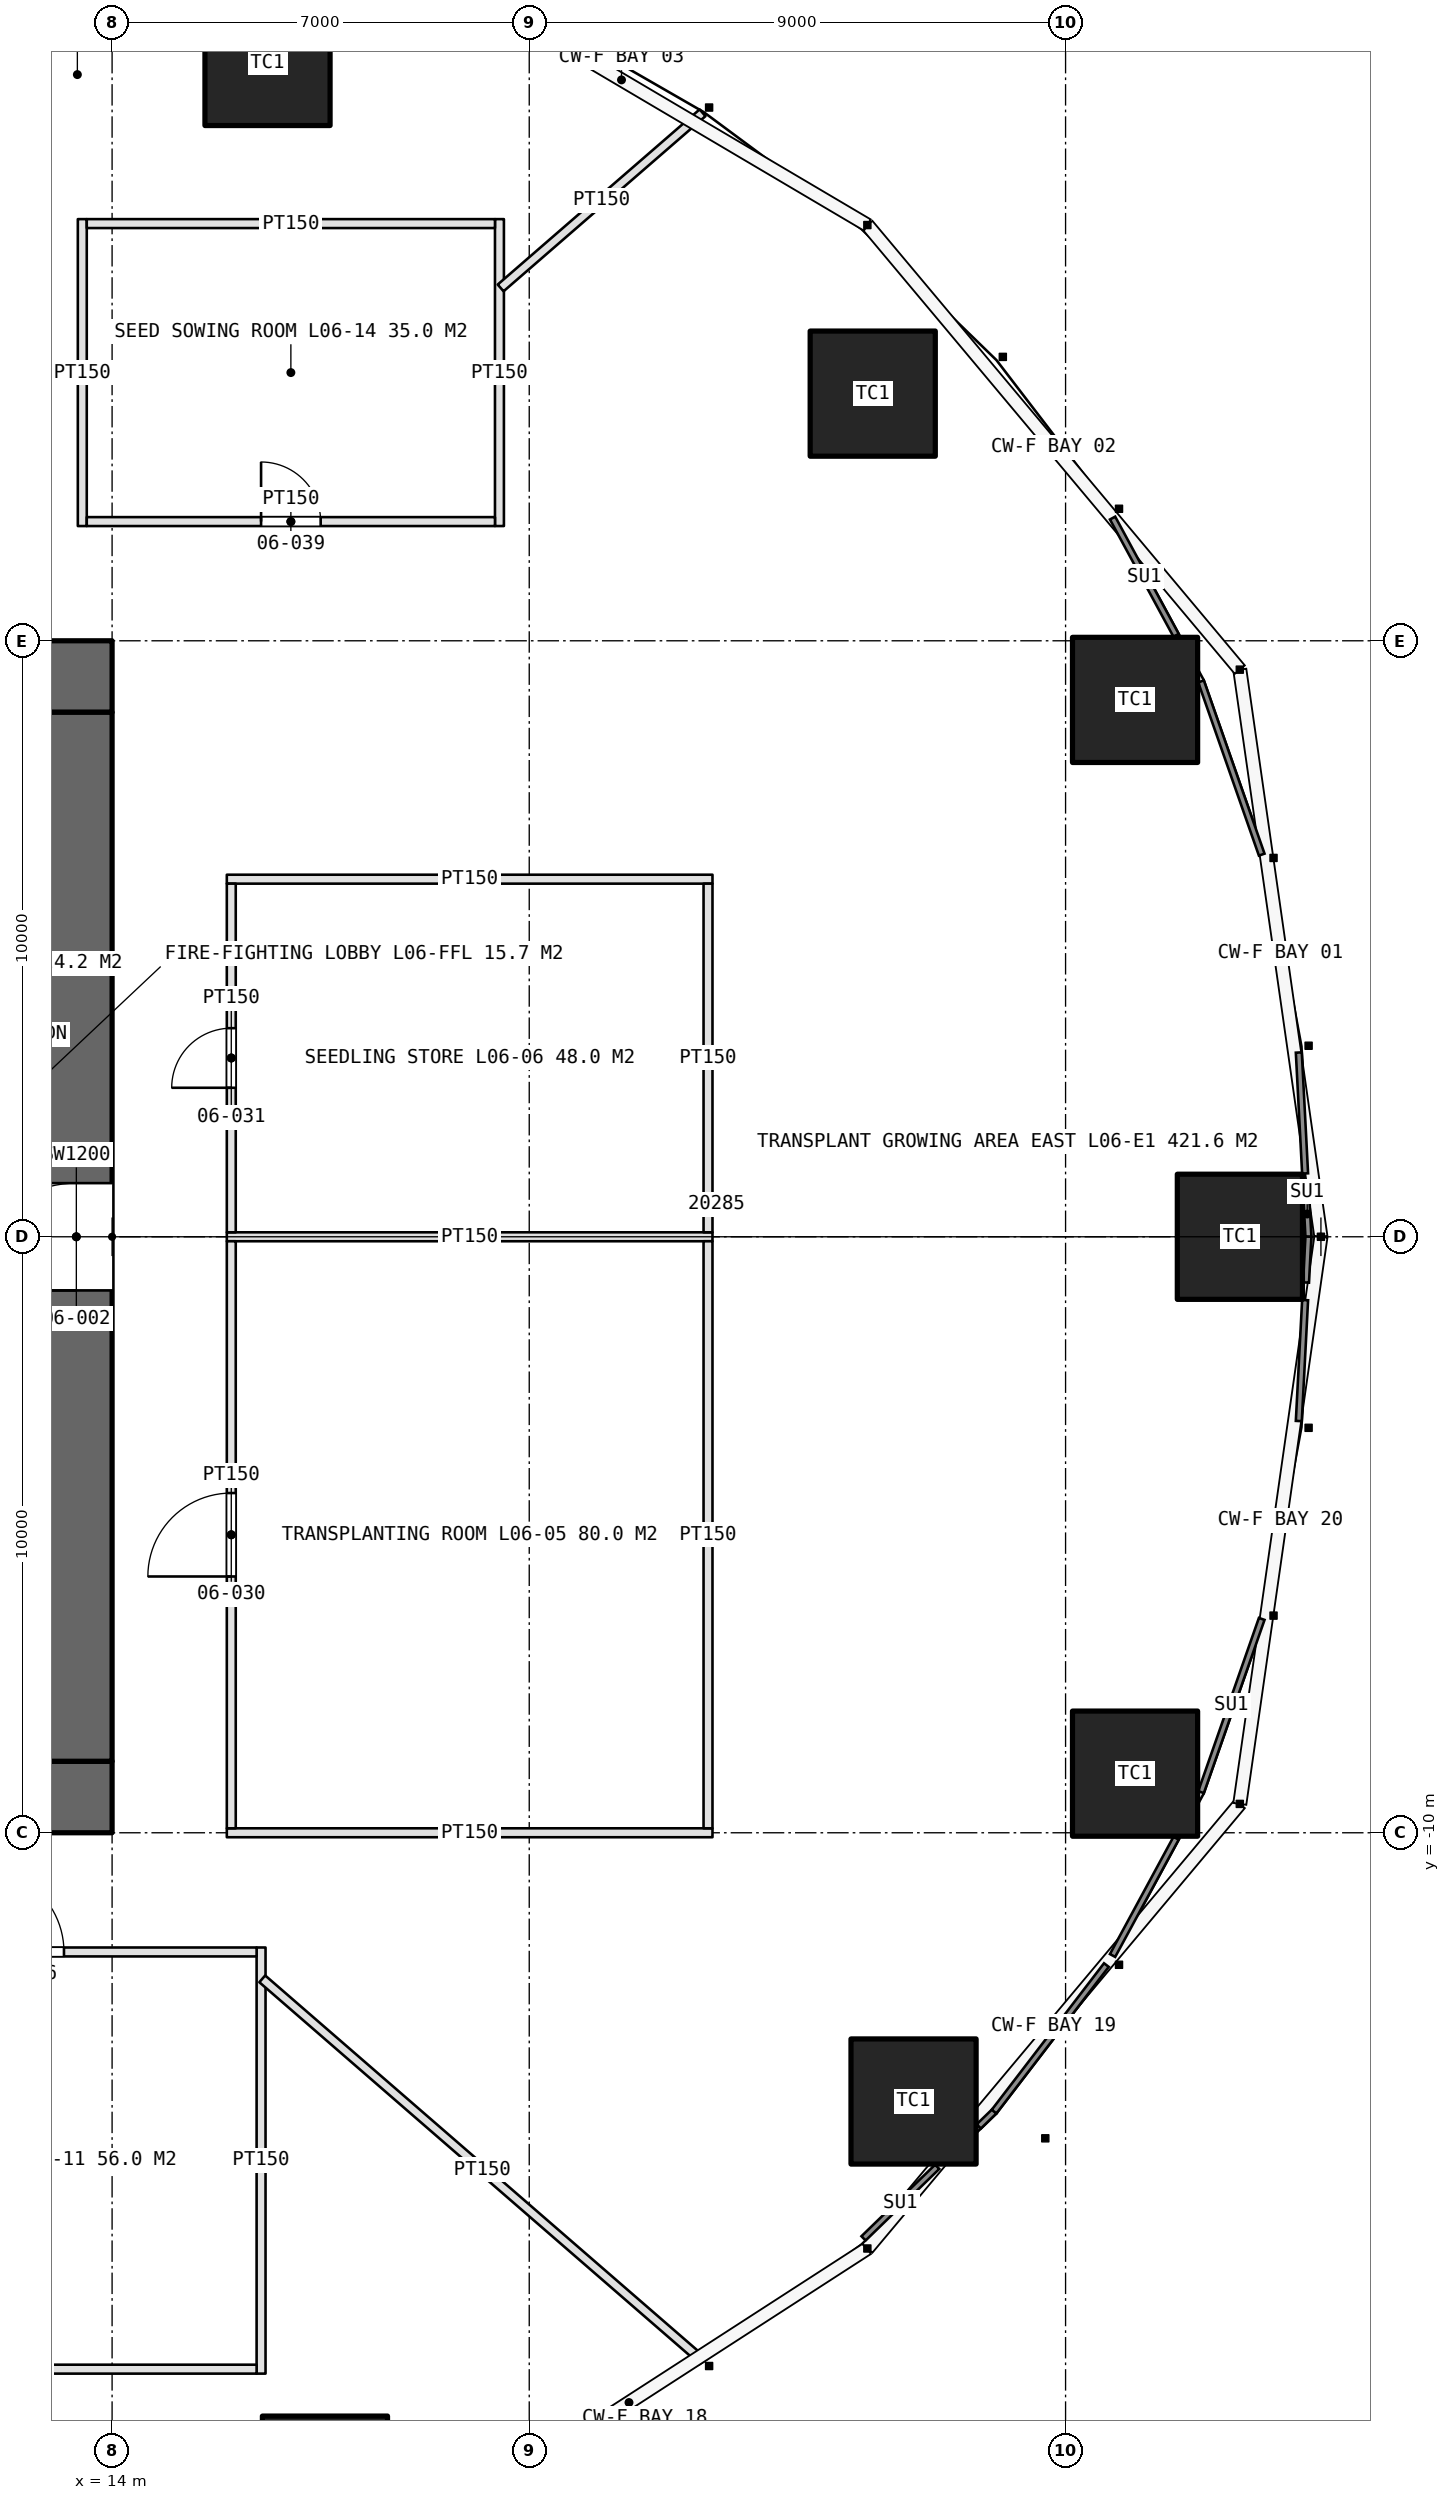
"""IFC4 building model, lengths in metres.
Left out: names, types, materials, properties, quantities, classifications, styles, units other than length and angle.
Written with IfcOpenShell. Run it as: python <this file> out.ifc"""

import sys

from ifc_helpers import new_model, si_unit, direction, frame, frame_2d, origin, origin_2d, place, context, subcontext, project, spatial, rectangle, extrude, element, fill, save


model = new_model("IFC4")
c1 = context("Model", 3, precision=1e-05, world=origin(), true_north=direction((0.0, 1.0)))
c2 = subcontext(c1, "Body", "Model", "MODEL_VIEW")
j1 = project(units=[si_unit("LENGTHUNIT", "METRE"), si_unit("PLANEANGLEUNIT", "RADIAN")], contexts=[c1])
p1 = place(None, origin())
s1 = spatial("IfcSite", under=j1, at=p1, CompositionType="ELEMENT")
p2 = place(p1, origin())
s2 = spatial("IfcBuilding", under=s1, at=p2, CompositionType="ELEMENT")
p3 = place(p2, frame((0.0, 0.0, 30.0)))
s3 = spatial("IfcBuildingStorey", under=s2, at=p3, CompositionType="ELEMENT", Elevation=30.0)
p4 = place(p3, frame((-14.0, -9.4, 0.0), z_axis=(0.0, 0.0, 1.0), x_axis=(1.0, 0.0, 0.0)))
e1 = element("IfcWall", 1, at=p4, inside=s3, PredefinedType="SHEAR", context=c2, shape_type="SweptSolid", body=[
    extrude(rectangle(XDim=28.0, YDim=1.2, at=frame_2d((14.0, 0.0))), origin(), (0.0, 0.0, 1.0), 5.0),
])
p5 = place(p4, frame((13.1, 0.0, 0.0)))
e2 = element("IfcOpeningElement", 2, at=p5, cuts=e1, PredefinedType="OPENING", context=c2, shape_type="SweptSolid", body=[
    extrude(rectangle(XDim=1.8, YDim=2.4, at=frame_2d((0.9, 1.2))), frame((0.0, 0.61, 0.0), z_axis=(0.0, -1.0, 0.0), x_axis=(1.0, 0.0, 0.0)), (0.0, 0.0, 1.0), 1.22),
])
p6 = place(p4, frame((22.9, 0.0, 0.0)))
e3 = element("IfcOpeningElement", 3, at=p6, cuts=e1, PredefinedType="OPENING", context=c2, shape_type="SweptSolid", body=[
    extrude(rectangle(XDim=2.2, YDim=2.7, at=frame_2d((1.1, 1.35))), frame((0.0, 0.61, 0.0), z_axis=(0.0, -1.0, 0.0), x_axis=(1.0, 0.0, 0.0)), (0.0, 0.0, 1.0), 1.22),
])
p7 = place(p3, frame((14.0, 9.4, 0.0), z_axis=(0.0, 0.0, 1.0), x_axis=(-1.0, 0.0, 0.0)))
e4 = element("IfcWall", 4, at=p7, inside=s3, PredefinedType="SHEAR", context=c2, shape_type="SweptSolid", body=[
    extrude(rectangle(XDim=28.0, YDim=1.2, at=frame_2d((14.0, 0.0))), origin(), (0.0, 0.0, 1.0), 5.0),
])
p8 = place(p7, frame((24.0, 0.0, 0.0)))
e5 = element("IfcOpeningElement", 5, at=p8, cuts=e4, PredefinedType="OPENING", context=c2, shape_type="SweptSolid", body=[
    extrude(rectangle(XDim=1.0, YDim=2.4, at=frame_2d((0.5, 1.2))), frame((0.0, 0.61, 0.0), z_axis=(0.0, -1.0, 0.0), x_axis=(1.0, 0.0, 0.0)), (0.0, 0.0, 1.0), 1.22),
])
p9 = place(p7, frame((13.1, 0.0, 0.0)))
e6 = element("IfcOpeningElement", 6, at=p9, cuts=e4, PredefinedType="OPENING", context=c2, shape_type="SweptSolid", body=[
    extrude(rectangle(XDim=1.8, YDim=2.4, at=frame_2d((0.9, 1.2))), frame((0.0, 0.61, 0.0), z_axis=(0.0, -1.0, 0.0), x_axis=(1.0, 0.0, 0.0)), (0.0, 0.0, 1.0), 1.22),
])
p10 = place(p3, frame((13.4, -8.8, 0.0), z_axis=(0.0, 0.0, 1.0), x_axis=(0.0, 1.0, 0.0)))
e7 = element("IfcWall", 7, at=p10, inside=s3, PredefinedType="SHEAR", context=c2, shape_type="SweptSolid", body=[
    extrude(rectangle(XDim=17.6, YDim=1.2, at=frame_2d((8.8, 0.0))), origin(), (0.0, 0.0, 1.0), 5.0),
])
p11 = place(p10, frame((7.9, 0.0, 0.0)))
e8 = element("IfcOpeningElement", 8, at=p11, cuts=e7, PredefinedType="OPENING", context=c2, shape_type="SweptSolid", body=[
    extrude(rectangle(XDim=1.8, YDim=2.4, at=frame_2d((0.9, 1.2))), frame((0.0, 0.61, 0.0), z_axis=(0.0, -1.0, 0.0), x_axis=(1.0, 0.0, 0.0)), (0.0, 0.0, 1.0), 1.22),
])
for number, where, z_axis, x_axis in (
    (9, (32.925, 0.0, 0.0), (0.0, 0.0, 1.0), (1.0, 0.0, 0.0)),
    (10, (31.166, 9.008, 0.0), (0.0, 0.0, 1.0), (1.0, 0.0, 0.0)),
    (11, (26.764, 14.147, 0.0), (0.0, 0.0, 1.0), (1.0, 0.0, 0.0)),
    (12, (16.608, 19.695, 0.0), (0.0, 0.0, 1.0), (1.0, 0.0, 0.0)),
    (13, (17.572, -20.837, 0.0), (0.0, 0.0, 1.0), (1.0, 0.0, 0.0)),
    (14, (27.449, -14.509, 0.0), (0.0, 0.0, 1.0), (1.0, 0.0, 0.0)),
    (15, (31.166, -9.008, 0.0), (0.0, 0.0, 1.0), (1.0, 0.0, 0.0)),
):
    element("IfcColumn", number, at=place(p3, frame(where, z_axis=z_axis, x_axis=x_axis)), inside=s3, PredefinedType="COLUMN", context=c2, shape_type="SweptSolid", body=[
        extrude(rectangle(XDim=2.1, YDim=2.1, at=origin_2d()), origin(), (0.0, 0.0, 1.0), 5.0),
    ])
for number, where, z_axis, x_axis in (
    (16, (15.925, -10.0, 0.0), (0.0, 0.0, 1.0), (1.0, 0.0, 0.0)),
    (17, (15.925, 0.0, 0.0), (0.0, 0.0, 1.0), (1.0, 0.0, 0.0)),
    (18, (15.925, 6.0, 0.0), (0.0, 0.0, 1.0), (1.0, 0.0, 0.0)),
):
    element("IfcWall", number, at=place(p3, frame(where, z_axis=z_axis, x_axis=x_axis)), inside=s3, PredefinedType="PARTITIONING", context=c2, shape_type="SweptSolid", body=[
        extrude(rectangle(XDim=8.15, YDim=0.15, at=frame_2d((4.075, 0.0))), origin(), (0.0, 0.0, 1.0), 3.6),
    ])
p12 = place(p3, frame((16.0, -9.925, 0.0), z_axis=(0.0, 0.0, 1.0), x_axis=(0.0, 1.0, 0.0)))
e19 = element("IfcWall", 19, at=p12, inside=s3, PredefinedType="PARTITIONING", context=c2, shape_type="SweptSolid", body=[
    extrude(rectangle(XDim=9.85, YDim=0.15, at=frame_2d((4.925, 0.0))), origin(), (0.0, 0.0, 1.0), 3.6),
])
p13 = place(p12, frame((4.225, 0.0, 0.0)))
e20 = element("IfcOpeningElement", 20, at=p13, cuts=e19, PredefinedType="OPENING", context=c2, shape_type="SweptSolid", body=[
    extrude(rectangle(XDim=1.4, YDim=2.4, at=frame_2d((0.7, 1.2))), frame((0.0, 0.085, 0.0), z_axis=(0.0, -1.0, 0.0), x_axis=(1.0, 0.0, 0.0)), (0.0, 0.0, 1.0), 0.17),
])
p14 = place(p3, frame((24.0, -9.925, 0.0), z_axis=(0.0, 0.0, 1.0), x_axis=(0.0, 1.0, 0.0)))
e21 = element("IfcWall", 21, at=p14, inside=s3, PredefinedType="PARTITIONING", context=c2, shape_type="SweptSolid", body=[
    extrude(rectangle(XDim=9.85, YDim=0.15, at=frame_2d((4.925, 0.0))), origin(), (0.0, 0.0, 1.0), 3.6),
])
p15 = place(p3, frame((16.0, 0.075, 0.0), z_axis=(0.0, 0.0, 1.0), x_axis=(0.0, 1.0, 0.0)))
e22 = element("IfcWall", 22, at=p15, inside=s3, PredefinedType="PARTITIONING", context=c2, shape_type="SweptSolid", body=[
    extrude(rectangle(XDim=5.85, YDim=0.15, at=frame_2d((2.925, 0.0))), origin(), (0.0, 0.0, 1.0), 3.6),
])
p16 = place(p15, frame((2.425, 0.0, 0.0)))
e23 = element("IfcOpeningElement", 23, at=p16, cuts=e22, PredefinedType="OPENING", context=c2, shape_type="SweptSolid", body=[
    extrude(rectangle(XDim=1.0, YDim=2.2, at=frame_2d((0.5, 1.1))), frame((0.0, 0.085, 0.0), z_axis=(0.0, -1.0, 0.0), x_axis=(1.0, 0.0, 0.0)), (0.0, 0.0, 1.0), 0.17),
])
p17 = place(p3, frame((24.0, 0.075, 0.0), z_axis=(0.0, 0.0, 1.0), x_axis=(0.0, 1.0, 0.0)))
e24 = element("IfcWall", 24, at=p17, inside=s3, PredefinedType="PARTITIONING", context=c2, shape_type="SweptSolid", body=[
    extrude(rectangle(XDim=5.85, YDim=0.15, at=frame_2d((2.925, 0.0))), origin(), (0.0, 0.0, 1.0), 3.6),
])
p18 = place(p3, frame((16.5, -11.925, 0.0), z_axis=(0.0, 0.0, 1.0), x_axis=(0.0, -1.0, 0.0)))
e25 = element("IfcWall", 25, at=p18, inside=s3, PredefinedType="PARTITIONING", context=c2, shape_type="SweptSolid", body=[
    extrude(rectangle(XDim=7.15, YDim=0.15, at=frame_2d((3.575, 0.0))), origin(), (0.0, 0.0, 1.0), 3.6),
])
p19 = place(p3, frame((8.56, -12.0, 0.0), z_axis=(0.0, 0.0, 1.0), x_axis=(1.0, 0.0, 0.0)))
e26 = element("IfcWall", 26, at=p19, inside=s3, PredefinedType="PARTITIONING", context=c2, shape_type="SweptSolid", body=[
    extrude(rectangle(XDim=7.865, YDim=0.15, at=frame_2d((3.933, 0.0))), origin(), (0.0, 0.0, 1.0), 3.6),
])
p20 = place(p19, frame((3.232, 0.0, 0.0)))
e27 = element("IfcOpeningElement", 27, at=p20, cuts=e26, PredefinedType="OPENING", context=c2, shape_type="SweptSolid", body=[
    extrude(rectangle(XDim=1.4, YDim=2.4, at=frame_2d((0.7, 1.2))), frame((0.0, 0.085, 0.0), z_axis=(0.0, -1.0, 0.0), x_axis=(1.0, 0.0, 0.0)), (0.0, 0.0, 1.0), 0.17),
])
p21 = place(p3, frame((8.56, -19.0, 0.0), z_axis=(0.0, 0.0, 1.0), x_axis=(1.0, 0.0, 0.0)))
e28 = element("IfcWall", 28, at=p21, inside=s3, PredefinedType="PARTITIONING", context=c2, shape_type="SweptSolid", body=[
    extrude(rectangle(XDim=7.865, YDim=0.15, at=frame_2d((3.933, 0.0))), origin(), (0.0, 0.0, 1.0), 3.6),
])
for number, where, z_axis, x_axis in (
    (29, (13.5, 11.925, 0.0), (0.0, 0.0, 1.0), (0.0, 1.0, 0.0)),
    (30, (20.5, 11.925, 0.0), (0.0, 0.0, 1.0), (0.0, 1.0, 0.0)),
):
    element("IfcWall", number, at=place(p3, frame(where, z_axis=z_axis, x_axis=x_axis)), inside=s3, PredefinedType="PARTITIONING", context=c2, shape_type="SweptSolid", body=[
        extrude(rectangle(XDim=5.15, YDim=0.15, at=frame_2d((2.575, 0.0))), origin(), (0.0, 0.0, 1.0), 3.6),
    ])
p22 = place(p3, frame((13.575, 12.0, 0.0), z_axis=(0.0, 0.0, 1.0), x_axis=(1.0, 0.0, 0.0)))
e31 = element("IfcWall", 31, at=p22, inside=s3, PredefinedType="PARTITIONING", context=c2, shape_type="SweptSolid", body=[
    extrude(rectangle(XDim=6.85, YDim=0.15, at=frame_2d((3.425, 0.0))), origin(), (0.0, 0.0, 1.0), 3.6),
])
p23 = place(p22, frame((2.925, 0.0, 0.0)))
e32 = element("IfcOpeningElement", 32, at=p23, cuts=e31, PredefinedType="OPENING", context=c2, shape_type="SweptSolid", body=[
    extrude(rectangle(XDim=1.0, YDim=2.2, at=frame_2d((0.5, 1.1))), frame((0.0, 0.085, 0.0), z_axis=(0.0, -1.0, 0.0), x_axis=(1.0, 0.0, 0.0)), (0.0, 0.0, 1.0), 0.17),
])
p24 = place(p3, frame((13.575, 17.0, 0.0), z_axis=(0.0, 0.0, 1.0), x_axis=(1.0, 0.0, 0.0)))
e33 = element("IfcWall", 33, at=p24, inside=s3, PredefinedType="PARTITIONING", context=c2, shape_type="SweptSolid", body=[
    extrude(rectangle(XDim=6.85, YDim=0.15, at=frame_2d((3.425, 0.0))), origin(), (0.0, 0.0, 1.0), 3.6),
])
p25 = place(p3, frame((16.52, -12.451, 0.0), z_axis=(0.0, 0.0, 1.0), x_axis=(0.75543039702, -0.655228902947, 0.0)))
e34 = element("IfcWall", 34, at=p25, inside=s3, PredefinedType="PARTITIONING", context=c2, shape_type="SweptSolid", body=[
    extrude(rectangle(XDim=9.78, YDim=0.15, at=frame_2d((4.89, 0.0))), origin(), (0.0, 0.0, 1.0), 3.6),
])
p26 = place(p3, frame((20.52, 15.92, 0.0), z_axis=(0.0, 0.0, 1.0), x_axis=(0.75543578361, 0.655222692557, 0.0)))
e35 = element("IfcWall", 35, at=p26, inside=s3, PredefinedType="PARTITIONING", context=c2, shape_type="SweptSolid", body=[
    extrude(rectangle(XDim=4.485, YDim=0.15, at=frame_2d((2.243, 0.0))), origin(), (0.0, 0.0, 1.0), 3.6),
])
p27 = place(p11, origin())
e36 = element("IfcDoor", 36, at=p27, inside=s3, OperationType="DOUBLE_DOOR_SINGLE_SWING", PredefinedType="DOOR", context=c2, shape_type="SweptSolid", body=[
    extrude(rectangle(XDim=1.8, YDim=2.4, at=frame_2d((0.9, 1.2))), frame((0.0, 0.025, 0.0), z_axis=(0.0, -1.0, 0.0), x_axis=(1.0, 0.0, 0.0)), (0.0, 0.0, 1.0), 0.05),
])
fill(e8, e36)
p28 = place(p13, origin())
e37 = element("IfcDoor", 37, at=p28, inside=s3, OperationType="DOUBLE_DOOR_DOUBLE_SWING", PredefinedType="DOOR", context=c2, shape_type="SweptSolid", body=[
    extrude(rectangle(XDim=1.4, YDim=2.4, at=frame_2d((0.7, 1.2))), frame((0.0, 0.025, 0.0), z_axis=(0.0, -1.0, 0.0), x_axis=(1.0, 0.0, 0.0)), (0.0, 0.0, 1.0), 0.05),
])
fill(e20, e37)
p29 = place(p16, origin())
e38 = element("IfcDoor", 38, at=p29, inside=s3, OperationType="SINGLE_SWING_LEFT", PredefinedType="DOOR", context=c2, shape_type="SweptSolid", body=[
    extrude(rectangle(XDim=1.0, YDim=2.2, at=frame_2d((0.5, 1.1))), frame((0.0, 0.025, 0.0), z_axis=(0.0, -1.0, 0.0), x_axis=(1.0, 0.0, 0.0)), (0.0, 0.0, 1.0), 0.05),
])
fill(e23, e38)
p30 = place(p20, origin())
e39 = element("IfcDoor", 39, at=p30, inside=s3, OperationType="DOUBLE_DOOR_DOUBLE_SWING", PredefinedType="DOOR", context=c2, shape_type="SweptSolid", body=[
    extrude(rectangle(XDim=1.4, YDim=2.4, at=frame_2d((0.7, 1.2))), frame((0.0, 0.025, 0.0), z_axis=(0.0, -1.0, 0.0), x_axis=(1.0, 0.0, 0.0)), (0.0, 0.0, 1.0), 0.05),
])
fill(e27, e39)
p31 = place(p23, origin())
e40 = element("IfcDoor", 40, at=p31, inside=s3, OperationType="SINGLE_SWING_LEFT", PredefinedType="DOOR", context=c2, shape_type="SweptSolid", body=[
    extrude(rectangle(XDim=1.0, YDim=2.2, at=frame_2d((0.5, 1.1))), frame((0.0, 0.025, 0.0), z_axis=(0.0, -1.0, 0.0), x_axis=(1.0, 0.0, 0.0)), (0.0, 0.0, 1.0), 0.05),
])
fill(e32, e40)
save(model, sys.argv[1])
